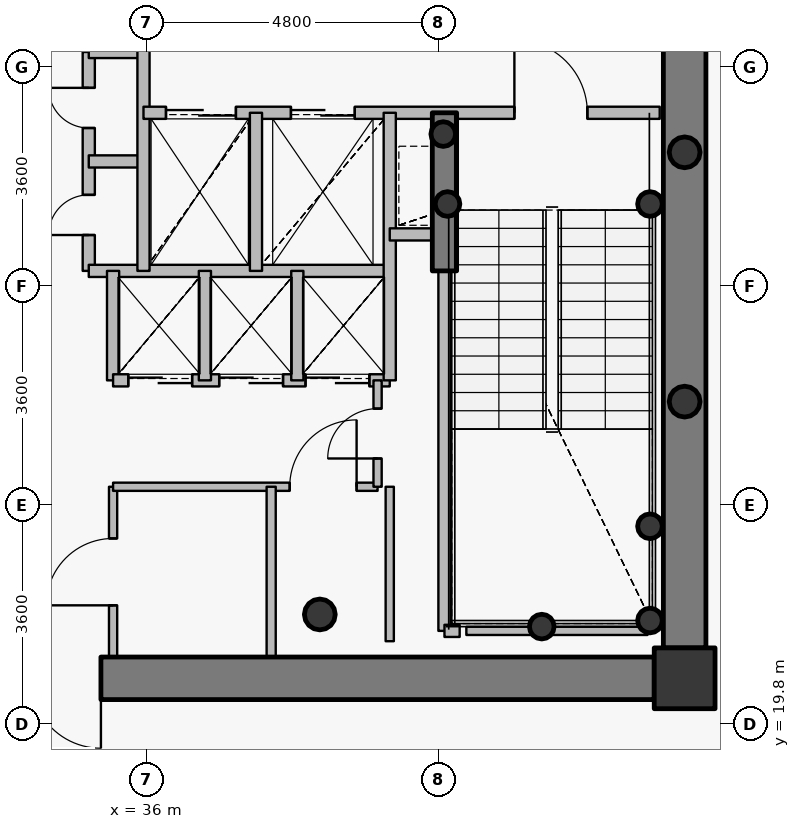
"""IFC4 building model, lengths in metres.
Left out: names, types, materials, properties, quantities, classifications, styles, units other than length and angle.
Written with IfcOpenShell. Run it as: python <this file> out.ifc"""

import sys

from ifc_helpers import new_model, si_unit, direction, frame, frame_2d, origin, origin_2d, place, context, subcontext, project, spatial, rectangle, hollow_circle, extrude, source, transform, mapped, element, fill, save


model = new_model("IFC4")
c1 = context("Model", 3, precision=1e-05, world=origin(), true_north=direction((0.0, 1.0)))
c2 = subcontext(c1, "Body", "Model", "MODEL_VIEW")
j1 = project(units=[si_unit("LENGTHUNIT", "METRE"), si_unit("PLANEANGLEUNIT", "RADIAN")], contexts=[c1])
p1 = place(None, origin())
s1 = spatial("IfcSite", under=j1, at=p1, CompositionType="ELEMENT")
p2 = place(p1, origin())
s2 = spatial("IfcBuilding", under=s1, at=p2, CompositionType="ELEMENT")
p3 = place(p2, frame((0.0, 0.0, 310.5)))
s3 = spatial("IfcBuildingStorey", under=s2, at=p3, CompositionType="ELEMENT", Elevation=310.5)
p4 = place(p3, frame((44.85, 20.55, 0.0), z_axis=(0.0, 0.0, 1.0), x_axis=(1.0, 0.0, 0.0)))
e1 = element("IfcColumn", 1, at=p4, inside=s3, PredefinedType="COLUMN", context=c2, shape_type="SweptSolid", body=[
    extrude(rectangle(XDim=1.0, YDim=1.0, at=origin_2d()), origin(), (0.0, 0.0, 1.0), 3.75),
])
p5 = place(p3, frame((38.85, 21.6, 0.0), z_axis=(0.0, 0.0, 1.0), x_axis=(1.0, 0.0, 0.0)))
e2 = element("IfcColumn", 2, at=p5, inside=s3, PredefinedType="COLUMN", context=c2, shape_type="SweptSolid", body=[
    extrude(hollow_circle(Radius=0.254, WallThickness=0.02, at=origin_2d()), origin(), (0.0, 0.0, 1.0), 3.75),
])
for number, where, z_axis, x_axis in (
    (3, (44.28, 21.5, 0.0), (0.0, 0.0, 1.0), (1.0, 0.0, 0.0)),
    (4, (44.28, 23.05, 0.0), (0.0, 0.0, 1.0), (1.0, 0.0, 0.0)),
    (5, (42.5, 21.4, 0.0), (0.0, 0.0, 1.0), (1.0, 0.0, 0.0)),
    (6, (40.95, 28.35, 0.0), (0.0, 0.0, 1.0), (1.0, 0.0, 0.0)),
    (7, (44.28, 28.35, 0.0), (0.0, 0.0, 1.0), (1.0, 0.0, 0.0)),
    (8, (40.88, 29.5, 0.0), (0.0, 0.0, 1.0), (1.0, 0.0, 0.0)),
):
    element("IfcColumn", number, at=place(p3, frame(where, z_axis=z_axis, x_axis=x_axis)), inside=s3, PredefinedType="COLUMN", context=c2, shape_type="SweptSolid", body=[
        extrude(hollow_circle(Radius=0.203, WallThickness=0.016, at=origin_2d()), origin(), (0.0, 0.0, 1.0), 3.75),
    ])
p6 = place(p3, frame((44.85, 32.95, 0.0), z_axis=(0.0, 0.0, 1.0), x_axis=(0.0, -1.0, 0.0)))
e9 = element("IfcWall", 9, at=p6, inside=s3, PredefinedType="SHEAR", context=c2, shape_type="SweptSolid", body=[
    extrude(rectangle(XDim=11.9, YDim=0.7, at=frame_2d((5.95, 0.0))), origin(), (0.0, 0.0, 1.0), 3.05),
])
p7 = place(p3, frame((44.35, 20.55, 0.0), z_axis=(0.0, 0.0, 1.0), x_axis=(-1.0, 0.0, 0.0)))
e10 = element("IfcWall", 10, at=p7, inside=s3, PredefinedType="SHEAR", context=c2, shape_type="SweptSolid", body=[
    extrude(rectangle(XDim=16.7, YDim=0.7, at=frame_2d((8.35, 0.0))), origin(), (0.0, 0.0, 1.0), 3.05),
])
p8 = place(p7, frame((12.925, 0.0, 0.0)))
e11 = element("IfcOpeningElement", 11, at=p8, cuts=e10, PredefinedType="OPENING", context=c2, shape_type="SweptSolid", body=[
    extrude(rectangle(XDim=1.15, YDim=2.15, at=origin_2d()), frame((0.575, 0.36, 1.075), z_axis=(0.0, -1.0, 0.0), x_axis=(1.0, 0.0, 0.0)), (0.0, 0.0, 1.0), 0.72),
])
p9 = place(p7, frame((9.1, 0.0, 0.0)))
e12 = element("IfcOpeningElement", 12, at=p9, cuts=e10, PredefinedType="OPENING", context=c2, shape_type="SweptSolid", body=[
    extrude(rectangle(XDim=1.15, YDim=2.15, at=origin_2d()), frame((0.575, 0.36, 1.075), z_axis=(0.0, -1.0, 0.0), x_axis=(1.0, 0.0, 0.0)), (0.0, 0.0, 1.0), 0.72),
])
p10 = place(p3, frame((40.9, 27.25, 0.0), z_axis=(0.0, 0.0, 1.0), x_axis=(0.0, 1.0, 0.0)))
e13 = element("IfcWall", 13, at=p10, inside=s3, PredefinedType="SHEAR", context=c2, shape_type="SweptSolid", body=[
    extrude(rectangle(XDim=2.6, YDim=0.4, at=frame_2d((1.3, 0.0))), origin(), (0.0, 0.0, 1.0), 3.1),
])
for number, where, z_axis, x_axis in (
    (14, (44.85, 25.1, 0.0), (0.0, 0.0, 1.0), (1.0, 0.0, 0.0)),
    (15, (44.85, 29.2, 0.0), (0.0, 0.0, 1.0), (1.0, 0.0, 0.0)),
):
    element("IfcColumn", number, at=place(p3, frame(where, z_axis=z_axis, x_axis=x_axis)), inside=s3, PredefinedType="COLUMN", context=c2, shape_type="SweptSolid", body=[
        extrude(hollow_circle(Radius=0.254, WallThickness=0.02, at=origin_2d()), origin(), (0.0, 0.0, 1.0), 3.75),
    ])
p11 = place(p3, frame((35.05, 27.25, 0.0), z_axis=(0.0, 0.0, 1.0), x_axis=(0.0, 1.0, 0.0)))
e16 = element("IfcWall", 16, at=p11, inside=s3, PredefinedType="PARTITIONING", context=c2, shape_type="SweptSolid", body=[
    extrude(rectangle(XDim=3.6, YDim=0.2, at=frame_2d((1.8, 0.0))), origin(), (0.0, 0.0, 1.0), 3.5),
])
p12 = place(p11, frame((0.59, 0.0, 0.0)))
e17 = element("IfcOpeningElement", 17, at=p12, cuts=e16, PredefinedType="OPENING", context=c2, shape_type="SweptSolid", body=[
    extrude(rectangle(XDim=0.66, YDim=2.05, at=origin_2d()), frame((0.33, 0.11, 1.025), z_axis=(0.0, -1.0, 0.0), x_axis=(1.0, 0.0, 0.0)), (0.0, 0.0, 1.0), 0.22),
])
p13 = place(p11, frame((2.35, 0.0, 0.0)))
e18 = element("IfcOpeningElement", 18, at=p13, cuts=e16, PredefinedType="OPENING", context=c2, shape_type="SweptSolid", body=[
    extrude(rectangle(XDim=0.66, YDim=2.05, at=origin_2d()), frame((0.33, 0.11, 1.025), z_axis=(0.0, -1.0, 0.0), x_axis=(1.0, 0.0, 0.0)), (0.0, 0.0, 1.0), 0.22),
])
p14 = place(p3, frame((35.05, 27.25, 0.0), z_axis=(0.0, 0.0, 1.0), x_axis=(1.0, 0.0, 0.0)))
e19 = element("IfcWall", 19, at=p14, inside=s3, PredefinedType="PARTITIONING", context=c2, shape_type="SweptSolid", body=[
    extrude(rectangle(XDim=4.95, YDim=0.2, at=frame_2d((2.475, 0.0))), origin(), (0.0, 0.0, 1.0), 3.085),
])
for number, where, z_axis, x_axis in (
    (20, (35.05, 29.05, 0.0), (0.0, 0.0, 1.0), (1.0, 0.0, 0.0)),
    (21, (35.05, 30.85, 0.0), (0.0, 0.0, 1.0), (1.0, 0.0, 0.0)),
):
    element("IfcWall", number, at=place(p3, frame(where, z_axis=z_axis, x_axis=x_axis)), inside=s3, PredefinedType="PARTITIONING", context=c2, shape_type="SweptSolid", body=[
        extrude(rectangle(XDim=0.9, YDim=0.2, at=frame_2d((0.45, 0.0))), origin(), (0.0, 0.0, 1.0), 3.5),
    ])
p15 = place(p3, frame((35.45, 20.9, 0.0), z_axis=(0.0, 0.0, 1.0), x_axis=(0.0, 1.0, 0.0)))
e22 = element("IfcWall", 22, at=p15, inside=s3, PredefinedType="PARTITIONING", context=c2, shape_type="SweptSolid", body=[
    extrude(rectangle(XDim=2.8, YDim=0.135, at=frame_2d((1.4, 0.0))), origin(), (0.0, 0.0, 1.0), 3.085),
])
p16 = place(p15, frame((0.85, 0.0, 0.0)))
e23 = element("IfcOpeningElement", 23, at=p16, cuts=e22, PredefinedType="OPENING", context=c2, shape_type="SweptSolid", body=[
    extrude(rectangle(XDim=1.1, YDim=2.15, at=origin_2d()), frame((0.55, 0.078, 1.075), z_axis=(0.0, -1.0, 0.0), x_axis=(1.0, 0.0, 0.0)), (0.0, 0.0, 1.0), 0.155),
])
p17 = place(p3, frame((35.45, 23.7, 0.0), z_axis=(0.0, 0.0, 1.0), x_axis=(1.0, 0.0, 0.0)))
e24 = element("IfcWall", 24, at=p17, inside=s3, PredefinedType="PARTITIONING", context=c2, shape_type="SweptSolid", body=[
    extrude(rectangle(XDim=4.35, YDim=0.135, at=frame_2d((2.175, 0.0))), origin(), (0.0, 0.0, 1.0), 3.085),
])
p18 = place(p17, frame((2.905, 0.0, 0.0)))
e25 = element("IfcOpeningElement", 25, at=p18, cuts=e24, PredefinedType="OPENING", context=c2, shape_type="SweptSolid", body=[
    extrude(rectangle(XDim=1.1, YDim=2.15, at=origin_2d()), frame((0.55, 0.078, 1.075), z_axis=(0.0, -1.0, 0.0), x_axis=(1.0, 0.0, 0.0)), (0.0, 0.0, 1.0), 0.155),
])
p19 = place(p3, frame((35.45, 25.45, 0.0), z_axis=(0.0, 0.0, 1.0), x_axis=(0.0, 1.0, 0.0)))
e26 = element("IfcWall", 26, at=p19, inside=s3, PredefinedType="PARTITIONING", context=c2, shape_type="SweptSolid", body=[
    extrude(rectangle(XDim=1.8, YDim=0.2, at=frame_2d((0.9, 0.0))), origin(), (0.0, 0.0, 1.0), 3.5),
])
p20 = place(p3, frame((35.45, 25.45, 0.0), z_axis=(0.0, 0.0, 1.0), x_axis=(1.0, 0.0, 0.0)))
e27 = element("IfcWall", 27, at=p20, inside=s3, PredefinedType="PARTITIONING", context=c2, shape_type="SweptSolid", body=[
    extrude(rectangle(XDim=4.55, YDim=0.2, at=frame_2d((2.275, 0.0))), origin(), (0.0, 0.0, 1.0), 3.085),
])
p21 = place(p20, frame((0.25, 0.0, 0.0)))
e28 = element("IfcOpeningElement", 28, at=p21, cuts=e27, PredefinedType="OPENING", context=c2, shape_type="SweptSolid", body=[
    extrude(rectangle(XDim=1.05, YDim=2.15, at=origin_2d()), frame((0.525, 0.11, 1.075), z_axis=(0.0, -1.0, 0.0), x_axis=(1.0, 0.0, 0.0)), (0.0, 0.0, 1.0), 0.22),
])
p22 = place(p20, frame((1.745, 0.0, 0.0)))
e29 = element("IfcOpeningElement", 29, at=p22, cuts=e27, PredefinedType="OPENING", context=c2, shape_type="SweptSolid", body=[
    extrude(rectangle(XDim=1.05, YDim=2.15, at=origin_2d()), frame((0.525, 0.11, 1.075), z_axis=(0.0, -1.0, 0.0), x_axis=(1.0, 0.0, 0.0)), (0.0, 0.0, 1.0), 0.22),
])
p23 = place(p20, frame((3.165, 0.0, 0.0)))
e30 = element("IfcOpeningElement", 30, at=p23, cuts=e27, PredefinedType="OPENING", context=c2, shape_type="SweptSolid", body=[
    extrude(rectangle(XDim=1.05, YDim=2.15, at=origin_2d()), frame((0.525, 0.11, 1.075), z_axis=(0.0, -1.0, 0.0), x_axis=(1.0, 0.0, 0.0)), (0.0, 0.0, 1.0), 0.22),
])
p24 = place(p3, frame((35.95, 27.25, 0.0), z_axis=(0.0, 0.0, 1.0), x_axis=(0.0, 1.0, 0.0)))
e31 = element("IfcWall", 31, at=p24, inside=s3, PredefinedType="PARTITIONING", context=c2, shape_type="SweptSolid", body=[
    extrude(rectangle(XDim=3.8, YDim=0.2, at=frame_2d((1.9, 0.0))), origin(), (0.0, 0.0, 1.0), 3.5),
])
p25 = place(p3, frame((35.95, 29.85, 0.0), z_axis=(0.0, 0.0, 1.0), x_axis=(1.0, 0.0, 0.0)))
e32 = element("IfcWall", 32, at=p25, inside=s3, PredefinedType="PARTITIONING", context=c2, shape_type="SweptSolid", body=[
    extrude(rectangle(XDim=8.49, YDim=0.2, at=frame_2d((4.245, 0.0))), origin(), (0.0, 0.0, 1.0), 3.085),
])
p26 = place(p25, frame((6.1, 0.0, 0.0)))
e33 = element("IfcOpeningElement", 33, at=p26, cuts=e32, PredefinedType="OPENING", context=c2, shape_type="SweptSolid", body=[
    extrude(rectangle(XDim=1.2, YDim=2.15, at=origin_2d()), frame((0.6, 0.11, 1.075), z_axis=(0.0, -1.0, 0.0), x_axis=(1.0, 0.0, 0.0)), (0.0, 0.0, 1.0), 0.22),
])
p27 = place(p25, frame((0.37, 0.0, 0.0)))
e34 = element("IfcOpeningElement", 34, at=p27, cuts=e32, PredefinedType="OPENING", context=c2, shape_type="SweptSolid", body=[
    extrude(rectangle(XDim=1.15, YDim=2.15, at=origin_2d()), frame((0.575, 0.11, 1.075), z_axis=(0.0, -1.0, 0.0), x_axis=(1.0, 0.0, 0.0)), (0.0, 0.0, 1.0), 0.22),
])
p28 = place(p25, frame((2.425, 0.0, 0.0)))
e35 = element("IfcOpeningElement", 35, at=p28, cuts=e32, PredefinedType="OPENING", context=c2, shape_type="SweptSolid", body=[
    extrude(rectangle(XDim=1.05, YDim=2.15, at=origin_2d()), frame((0.525, 0.11, 1.075), z_axis=(0.0, -1.0, 0.0), x_axis=(1.0, 0.0, 0.0)), (0.0, 0.0, 1.0), 0.22),
])
p29 = place(p3, frame((36.96, 25.45, 0.0), z_axis=(0.0, 0.0, 1.0), x_axis=(0.0, 1.0, 0.0)))
e36 = element("IfcWall", 36, at=p29, inside=s3, PredefinedType="PARTITIONING", context=c2, shape_type="SweptSolid", body=[
    extrude(rectangle(XDim=1.8, YDim=0.2, at=frame_2d((0.9, 0.0))), origin(), (0.0, 0.0, 1.0), 3.5),
])
p30 = place(p3, frame((37.8, 27.25, 0.0), z_axis=(0.0, 0.0, 1.0), x_axis=(0.0, 1.0, 0.0)))
e37 = element("IfcWall", 37, at=p30, inside=s3, PredefinedType="PARTITIONING", context=c2, shape_type="SweptSolid", body=[
    extrude(rectangle(XDim=2.6, YDim=0.2, at=frame_2d((1.3, 0.0))), origin(), (0.0, 0.0, 1.0), 3.5),
])
p31 = place(p3, frame((38.05, 20.38, 0.0), z_axis=(0.0, 0.0, 1.0), x_axis=(0.0, 1.0, 0.0)))
e38 = element("IfcWall", 38, at=p31, inside=s3, PredefinedType="PARTITIONING", context=c2, shape_type="SweptSolid", body=[
    extrude(rectangle(XDim=3.32, YDim=0.15, at=frame_2d((1.66, 0.0))), origin(), (0.0, 0.0, 1.0), 3.035),
])
p32 = place(p3, frame((38.48, 25.45, 0.0), z_axis=(0.0, 0.0, 1.0), x_axis=(0.0, 1.0, 0.0)))
e39 = element("IfcWall", 39, at=p32, inside=s3, PredefinedType="PARTITIONING", context=c2, shape_type="SweptSolid", body=[
    extrude(rectangle(XDim=1.8, YDim=0.2, at=frame_2d((0.9, 0.0))), origin(), (0.0, 0.0, 1.0), 3.5),
])
p33 = place(p3, frame((39.8, 23.7, 0.0), z_axis=(0.0, 0.0, 1.0), x_axis=(0.0, 1.0, 0.0)))
e40 = element("IfcWall", 40, at=p33, inside=s3, PredefinedType="PARTITIONING", context=c2, shape_type="SweptSolid", body=[
    extrude(rectangle(XDim=1.75, YDim=0.135, at=frame_2d((0.875, 0.0))), origin(), (0.0, 0.0, 1.0), 3.5),
])
p34 = place(p33, frame((0.465, 0.0, 0.0)))
e41 = element("IfcOpeningElement", 41, at=p34, cuts=e40, PredefinedType="OPENING", context=c2, shape_type="SweptSolid", body=[
    extrude(rectangle(XDim=0.82, YDim=2.1, at=origin_2d()), frame((0.41, 0.078, 1.05), z_axis=(0.0, -1.0, 0.0), x_axis=(1.0, 0.0, 0.0)), (0.0, 0.0, 1.0), 0.155),
])
p35 = place(p3, frame((40.0, 25.45, 0.0), z_axis=(0.0, 0.0, 1.0), x_axis=(0.0, 1.0, 0.0)))
e42 = element("IfcWall", 42, at=p35, inside=s3, PredefinedType="PARTITIONING", context=c2, shape_type="SweptSolid", body=[
    extrude(rectangle(XDim=4.4, YDim=0.2, at=frame_2d((2.2, 0.0))), origin(), (0.0, 0.0, 1.0), 3.5),
])
p36 = place(p3, frame((40.0, 27.85, 0.0), z_axis=(0.0, 0.0, 1.0), x_axis=(1.0, 0.0, 0.0)))
e43 = element("IfcWall", 43, at=p36, inside=s3, PredefinedType="PARTITIONING", context=c2, shape_type="SweptSolid", body=[
    extrude(rectangle(XDim=0.9, YDim=0.2, at=frame_2d((0.45, 0.0))), origin(), (0.0, 0.0, 1.0), 3.5),
])
p37 = place(p3, frame((40.9, 21.33, 0.0), z_axis=(0.0, 0.0, 1.0), x_axis=(0.0, 1.0, 0.0)))
e44 = element("IfcWall", 44, at=p37, inside=s3, PredefinedType="PARTITIONING", context=c2, shape_type="SweptSolid", body=[
    extrude(rectangle(XDim=5.91, YDim=0.2, at=frame_2d((2.955, 0.0))), origin(), (0.0, 0.0, 1.0), 3.035),
])
p38 = place(p3, frame((40.9, 21.33, 0.0), z_axis=(0.0, 0.0, 1.0), x_axis=(1.0, 0.0, 0.0)))
e45 = element("IfcWall", 45, at=p38, inside=s3, PredefinedType="PARTITIONING", context=c2, shape_type="SweptSolid", body=[
    extrude(rectangle(XDim=0.25, YDim=0.2, at=frame_2d((0.125, 0.0))), origin(), (0.0, 0.0, 1.0), 3.035),
])
p39 = place(p3, frame((44.24, 21.33, 0.0), z_axis=(0.0, 0.0, 1.0), x_axis=(-1.0, 0.0, 0.0)))
e46 = element("IfcWall", 46, at=p39, inside=s3, PredefinedType="PARTITIONING", context=c2, shape_type="SweptSolid", body=[
    extrude(rectangle(XDim=2.98, YDim=0.135, at=frame_2d((1.49, 0.0))), origin(), (0.0, 0.0, 1.0), 3.035),
])
p40 = place(p3, frame((40.0, 23.7, 0.0), z_axis=(0.0, 0.0, 1.0), x_axis=(0.0, -1.0, 0.0)))
e47 = element("IfcWall", 47, at=p40, inside=s3, PredefinedType="PARTITIONING", context=c2, shape_type="SweptSolid", body=[
    extrude(rectangle(XDim=2.54, YDim=0.135, at=frame_2d((1.27, 0.0))), origin(), (0.0, 0.0, 1.0), 3.035),
])
p41 = place(p3, frame((44.36, 20.2, 0.0), z_axis=(0.0, 0.0, 1.0), x_axis=(1.0, 0.0, 0.0)))
e48 = element("IfcWall", 48, at=p41, inside=s3, PredefinedType="PARTITIONING", context=c2, shape_type="SweptSolid", body=[
    extrude(rectangle(XDim=0.84, YDim=0.135, at=frame_2d((0.42, 0.0))), origin(), (0.0, 0.0, 1.0), 3.035),
])
p42 = place(p3, frame((45.2, 20.508, 0.0), z_axis=(0.0, 0.0, 1.0), x_axis=(0.0, 1.0, 0.0)))
e49 = element("IfcWall", 49, at=p42, inside=s3, PredefinedType="PARTITIONING", context=c2, shape_type="SweptSolid", body=[
    extrude(rectangle(XDim=0.532, YDim=0.135, at=frame_2d((0.266, 0.0))), origin(), (0.0, 0.0, 1.0), 3.5),
])
m1 = source(origin(), c2, "Body", "SweptSolid", [
    extrude(rectangle(XDim=1.15, YDim=2.15, at=origin_2d()), frame((0.575, 0.025, 1.075), z_axis=(0.0, -1.0, 0.0), x_axis=(1.0, 0.0, 0.0)), (0.0, 0.0, 1.0), 0.05),
])
p43 = place(p9, origin())
e50 = element("IfcDoor", 50, at=p43, inside=s3, OperationType="SINGLE_SWING_LEFT", PredefinedType="DOOR", context=c2, shape_type="MappedRepresentation", body=[
    mapped(m1, transform((0.0, 0.0, 0.0), x_axis=(1.0, 0.0, 0.0), y_axis=(0.0, 1.0, 0.0), z_axis=(0.0, 0.0, 1.0), scale=1.0)),
])
fill(e12, e50)
m2 = source(origin(), c2, "Body", "SweptSolid", [
    extrude(rectangle(XDim=1.2, YDim=2.15, at=origin_2d()), frame((0.6, 0.025, 1.075), z_axis=(0.0, -1.0, 0.0), x_axis=(1.0, 0.0, 0.0)), (0.0, 0.0, 1.0), 0.05),
])
p44 = place(p26, origin())
e51 = element("IfcDoor", 51, at=p44, inside=s3, OperationType="SINGLE_SWING_LEFT", PredefinedType="DOOR", context=c2, shape_type="MappedRepresentation", body=[
    mapped(m2, transform((0.0, 0.0, 0.0), x_axis=(1.0, 0.0, 0.0), y_axis=(0.0, 1.0, 0.0), z_axis=(0.0, 0.0, 1.0), scale=1.0)),
])
fill(e33, e51)
m3 = source(origin(), c2, "Body", "SweptSolid", [
    extrude(rectangle(XDim=1.15, YDim=2.15, at=origin_2d()), frame((0.575, 0.025, 1.075), z_axis=(0.0, -1.0, 0.0), x_axis=(1.0, 0.0, 0.0)), (0.0, 0.0, 1.0), 0.05),
])
p45 = place(p27, origin())
e52 = element("IfcDoor", 52, at=p45, inside=s3, OperationType="DOUBLE_DOOR_SLIDING", PredefinedType="USERDEFINED", context=c2, shape_type="MappedRepresentation", body=[
    mapped(m3, transform((0.0, 0.0, 0.0), x_axis=(1.0, 0.0, 0.0), y_axis=(0.0, 1.0, 0.0), z_axis=(0.0, 0.0, 1.0), scale=1.0)),
])
fill(e34, e52)
m4 = source(origin(), c2, "Body", "SweptSolid", [
    extrude(rectangle(XDim=1.05, YDim=2.15, at=origin_2d()), frame((0.525, 0.025, 1.075), z_axis=(0.0, -1.0, 0.0), x_axis=(1.0, 0.0, 0.0)), (0.0, 0.0, 1.0), 0.05),
])
p46 = place(p28, origin())
e53 = element("IfcDoor", 53, at=p46, inside=s3, OperationType="DOUBLE_DOOR_SLIDING", PredefinedType="USERDEFINED", context=c2, shape_type="MappedRepresentation", body=[
    mapped(m4, transform((0.0, 0.0, 0.0), x_axis=(1.0, 0.0, 0.0), y_axis=(0.0, 1.0, 0.0), z_axis=(0.0, 0.0, 1.0), scale=1.0)),
])
fill(e35, e53)
p47 = place(p21, origin())
e54 = element("IfcDoor", 54, at=p47, inside=s3, OperationType="DOUBLE_DOOR_SLIDING", PredefinedType="USERDEFINED", context=c2, shape_type="MappedRepresentation", body=[
    mapped(m4, transform((0.0, 0.0, 0.0), x_axis=(1.0, 0.0, 0.0), y_axis=(0.0, 1.0, 0.0), z_axis=(0.0, 0.0, 1.0), scale=1.0)),
])
fill(e28, e54)
p48 = place(p22, origin())
e55 = element("IfcDoor", 55, at=p48, inside=s3, OperationType="DOUBLE_DOOR_SLIDING", PredefinedType="USERDEFINED", context=c2, shape_type="MappedRepresentation", body=[
    mapped(m4, transform((0.0, 0.0, 0.0), x_axis=(1.0, 0.0, 0.0), y_axis=(0.0, 1.0, 0.0), z_axis=(0.0, 0.0, 1.0), scale=1.0)),
])
fill(e29, e55)
p49 = place(p23, origin())
e56 = element("IfcDoor", 56, at=p49, inside=s3, OperationType="DOUBLE_DOOR_SLIDING", PredefinedType="USERDEFINED", context=c2, shape_type="MappedRepresentation", body=[
    mapped(m4, transform((0.0, 0.0, 0.0), x_axis=(1.0, 0.0, 0.0), y_axis=(0.0, 1.0, 0.0), z_axis=(0.0, 0.0, 1.0), scale=1.0)),
])
fill(e30, e56)
m5 = source(origin(), c2, "Body", "SweptSolid", [
    extrude(rectangle(XDim=0.66, YDim=2.05, at=origin_2d()), frame((0.33, 0.025, 1.025), z_axis=(0.0, -1.0, 0.0), x_axis=(1.0, 0.0, 0.0)), (0.0, 0.0, 1.0), 0.05),
])
p50 = place(p12, origin())
e57 = element("IfcDoor", 57, at=p50, inside=s3, OperationType="SINGLE_SWING_LEFT", PredefinedType="USERDEFINED", context=c2, shape_type="MappedRepresentation", body=[
    mapped(m5, transform((0.0, 0.0, 0.0), x_axis=(1.0, 0.0, 0.0), y_axis=(0.0, 1.0, 0.0), z_axis=(0.0, 0.0, 1.0), scale=1.0)),
])
fill(e17, e57)
p51 = place(p13, origin())
e58 = element("IfcDoor", 58, at=p51, inside=s3, OperationType="SINGLE_SWING_RIGHT", PredefinedType="USERDEFINED", context=c2, shape_type="MappedRepresentation", body=[
    mapped(m5, transform((0.0, 0.0, 0.0), x_axis=(1.0, 0.0, 0.0), y_axis=(0.0, 1.0, 0.0), z_axis=(0.0, 0.0, 1.0), scale=1.0)),
])
fill(e18, e58)
m6 = source(origin(), c2, "Body", "SweptSolid", [
    extrude(rectangle(XDim=1.1, YDim=2.15, at=origin_2d()), frame((0.55, 0.025, 1.075), z_axis=(0.0, -1.0, 0.0), x_axis=(1.0, 0.0, 0.0)), (0.0, 0.0, 1.0), 0.05),
])
p52 = place(p16, origin())
e59 = element("IfcDoor", 59, at=p52, inside=s3, OperationType="SINGLE_SWING_LEFT", PredefinedType="DOOR", context=c2, shape_type="MappedRepresentation", body=[
    mapped(m6, transform((0.0, 0.0, 0.0), x_axis=(1.0, 0.0, 0.0), y_axis=(0.0, 1.0, 0.0), z_axis=(0.0, 0.0, 1.0), scale=1.0)),
])
fill(e23, e59)
p53 = place(p18, origin())
e60 = element("IfcDoor", 60, at=p53, inside=s3, OperationType="SINGLE_SWING_RIGHT", PredefinedType="DOOR", context=c2, shape_type="MappedRepresentation", body=[
    mapped(m6, transform((0.0, 0.0, 0.0), x_axis=(1.0, 0.0, 0.0), y_axis=(0.0, 1.0, 0.0), z_axis=(0.0, 0.0, 1.0), scale=1.0)),
])
fill(e25, e60)
m7 = source(origin(), c2, "Body", "SweptSolid", [
    extrude(rectangle(XDim=0.82, YDim=2.1, at=origin_2d()), frame((0.41, 0.025, 1.05), z_axis=(0.0, -1.0, 0.0), x_axis=(1.0, 0.0, 0.0)), (0.0, 0.0, 1.0), 0.05),
])
p54 = place(p34, origin())
e61 = element("IfcDoor", 61, at=p54, inside=s3, OperationType="SINGLE_SWING_LEFT", PredefinedType="DOOR", context=c2, shape_type="MappedRepresentation", body=[
    mapped(m7, transform((0.0, 0.0, 0.0), x_axis=(1.0, 0.0, 0.0), y_axis=(0.0, 1.0, 0.0), z_axis=(0.0, 0.0, 1.0), scale=1.0)),
])
fill(e41, e61)
save(model, sys.argv[1])
